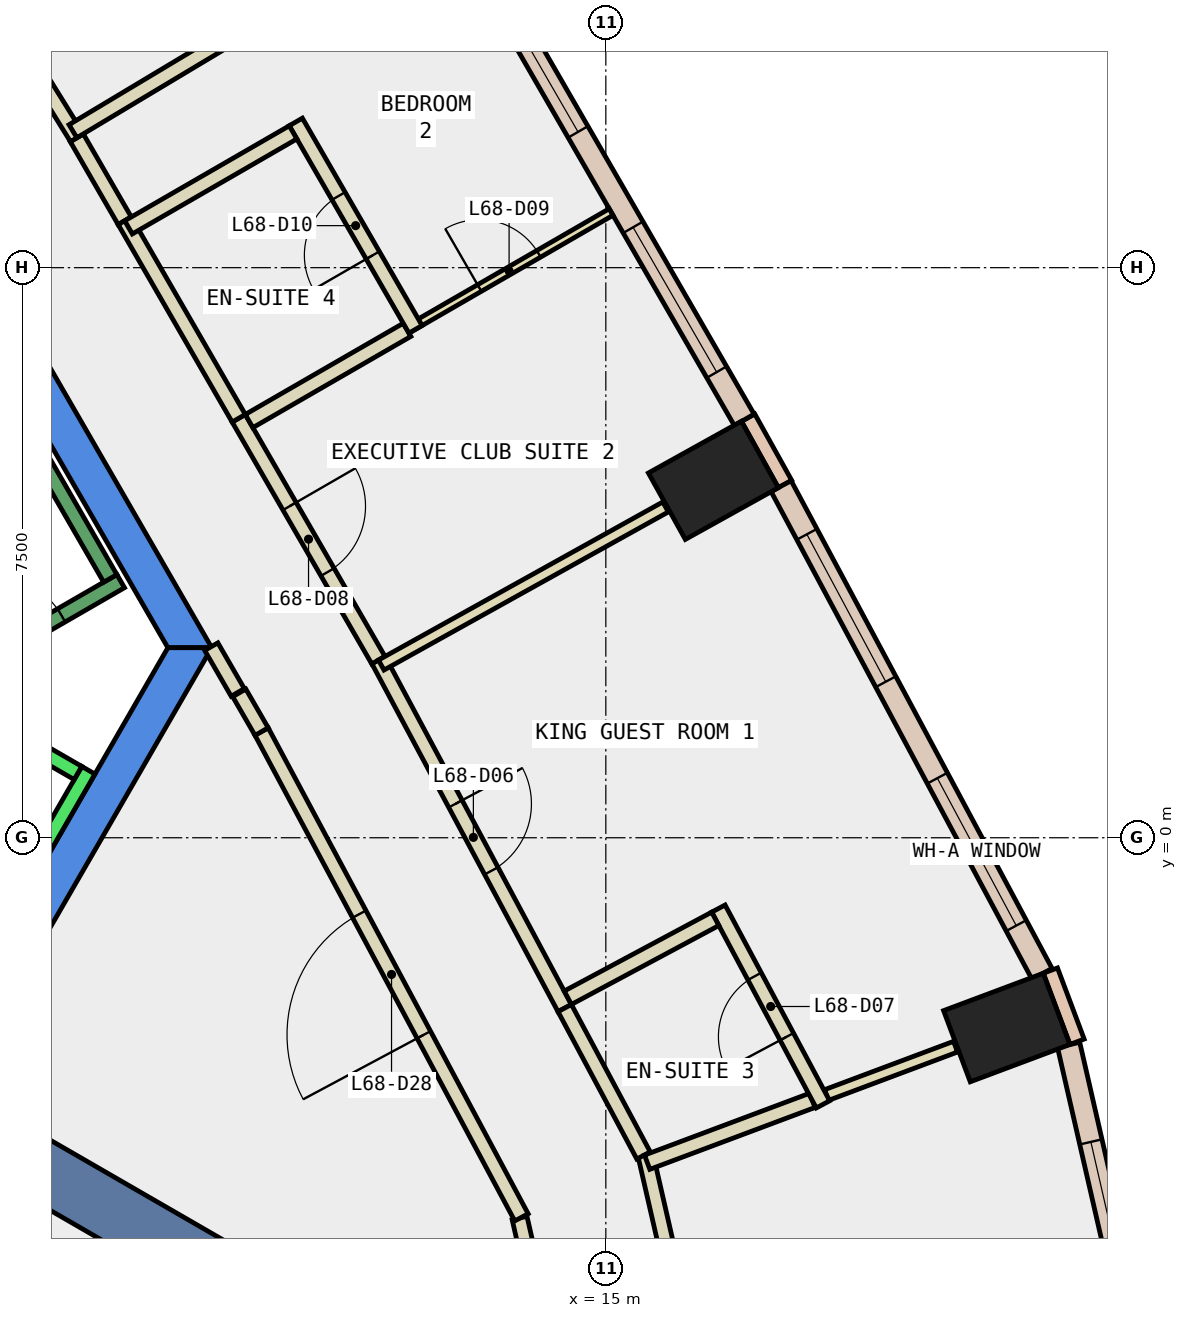
"""IFC4 building model, lengths in metres.
Left out: names, types, materials, properties, quantities, classifications, styles, units other than length and angle.
Written with IfcOpenShell. Run it as: python <this file> out.ifc"""

import sys

from ifc_helpers import new_model, si_unit, direction, frame, frame_2d, origin, origin_2d, place, context, subcontext, project, spatial, polyline, rectangle, outline, extrude, element, fill, save


model = new_model("IFC4")
c1 = context("Model", 3, precision=1e-05, world=origin(), true_north=direction((0.0, 1.0)))
c2 = subcontext(c1, "Body", "Model", "MODEL_VIEW")
j1 = project(units=[si_unit("LENGTHUNIT", "METRE"), si_unit("PLANEANGLEUNIT", "RADIAN")], contexts=[c1])
p1 = place(None, origin())
s1 = spatial("IfcSite", under=j1, at=p1, CompositionType="ELEMENT")
p2 = place(p1, origin())
s2 = spatial("IfcBuilding", under=s1, at=p2, CompositionType="ELEMENT")
p3 = place(p2, frame((0.0, 0.0, 293.6)))
s3 = spatial("IfcBuildingStorey", under=s2, at=p3, CompositionType="ELEMENT", Elevation=293.6)
for number, where, z_axis, x_axis in (
    (1, (20.275, -2.497, -0.34), (0.0, 0.0, 1.0), (-0.351, 0.936, 0.0)),
    (2, (16.415, 4.702, -0.34), (0.0, 0.0, 1.0), (-0.486, 0.874, 0.0)),
):
    element("IfcColumn", number, at=place(p3, frame(where, z_axis=z_axis, x_axis=x_axis)), inside=s3, PredefinedType="COLUMN", context=c2, shape_type="SweptSolid", body=[
        extrude(rectangle(XDim=1.0, YDim=1.4, at=origin_2d()), origin(), (0.0, 0.0, 1.0), 3.6),
    ])
p4 = place(p3, frame((0.0, 0.0, -0.34)))
e3 = element("IfcWall", 3, at=p4, inside=s3, PredefinedType="SHEAR", context=c2, shape_type="SweptSolid", body=[
    extrude(outline(polyline([(5.486, 9.998), (5.053, 9.748), (9.238, 2.5), (9.815, 2.5), (5.486, 9.998)])), origin(), (0.0, 0.0, 1.0), 3.6),
])
p5 = place(p3, frame((0.0, 0.0, -0.34)))
e4 = element("IfcWall", 4, at=p5, inside=s3, PredefinedType="SHEAR", context=c2, shape_type="SweptSolid", body=[
    extrude(outline(polyline([(4.907, -6.0), (9.815, 2.5), (9.238, 2.5), (4.619, -5.5), (4.907, -6.0)])), origin(), (0.0, 0.0, 1.0), 3.6),
])
p6 = place(p3, frame((6.279, -3.625, -0.34), z_axis=(0.0, 0.0, 1.0), x_axis=(0.866017533419, -0.500013631625, 0.0)))
e5 = element("IfcWall", 5, at=p6, inside=s3, PredefinedType="SHEAR", context=c2, shape_type="SweptSolid", body=[
    extrude(rectangle(XDim=9.0, YDim=0.8, at=frame_2d((4.5, 0.0))), origin(), (0.0, 0.0, 1.0), 3.6),
])
p7 = place(p3, frame((21.2, -2.684, 0.0), z_axis=(0.0, 0.0, 1.0), x_axis=(-0.350962844851, 0.936389385637, 0.0)))
e6 = element("IfcWall", 6, at=p7, inside=s3, PredefinedType="STANDARD", context=c2, shape_type="SweptSolid", body=[
    extrude(rectangle(XDim=1.0, YDim=0.2, at=frame_2d((0.5, 0.0))), origin(), (0.0, 0.0, 1.0), 3.26),
])
p8 = place(p3, frame((17.358, 4.653, 0.0), z_axis=(0.0, 0.0, 1.0), x_axis=(-0.485850211157, 0.874042088414, 0.0)))
e7 = element("IfcWall", 7, at=p8, inside=s3, PredefinedType="STANDARD", context=c2, shape_type="SweptSolid", body=[
    extrude(rectangle(XDim=1.0, YDim=0.2, at=frame_2d((0.5, 0.0))), origin(), (0.0, 0.0, 1.0), 3.26),
])
p9 = place(p3, frame((21.987, -6.642, 0.0), z_axis=(0.0, 0.0, 1.0), x_axis=(-0.223448307338, 0.974715781112, 0.0)))
e8 = element("IfcWall", 8, at=p9, inside=s3, PredefinedType="STANDARD", context=c2, shape_type="SweptSolid", body=[
    extrude(rectangle(XDim=4.019, YDim=0.3, at=frame_2d((2.009, 0.0))), origin(), (0.0, 0.0, 1.0), 3.26),
])
p10 = place(p9, frame((1.309, 0.0, 0.9)))
e9 = element("IfcOpeningElement", 9, at=p10, cuts=e8, PredefinedType="OPENING", context=c2, shape_type="SweptSolid", body=[
    extrude(rectangle(XDim=1.4, YDim=2.0, at=frame_2d((0.7, 1.0))), frame((0.0, 0.16, 0.0), z_axis=(0.0, -1.0, 0.0), x_axis=(1.0, 0.0, 0.0)), (0.0, 0.0, 1.0), 0.32),
])
p11 = place(p3, frame((20.739, -1.79, 0.0), z_axis=(0.0, 0.0, 1.0), x_axis=(-0.471789353675, 0.881711293882, 0.0)))
e10 = element("IfcWall", 10, at=p11, inside=s3, PredefinedType="STANDARD", context=c2, shape_type="SweptSolid", body=[
    extrude(rectangle(XDim=7.277, YDim=0.3, at=frame_2d((3.638, 0.0))), origin(), (0.0, 0.0, 1.0), 3.26),
])
p12 = place(p11, frame((0.719, 0.0, 0.9)))
e11 = element("IfcOpeningElement", 11, at=p12, cuts=e10, PredefinedType="OPENING", context=c2, shape_type="SweptSolid", body=[
    extrude(rectangle(XDim=2.2, YDim=2.0, at=frame_2d((1.1, 1.0))), frame((0.0, 0.16, 0.0), z_axis=(0.0, -1.0, 0.0), x_axis=(1.0, 0.0, 0.0)), (0.0, 0.0, 1.0), 0.32),
])
p13 = place(p11, frame((4.358, 0.0, 0.9)))
e12 = element("IfcOpeningElement", 12, at=p13, cuts=e10, PredefinedType="OPENING", context=c2, shape_type="SweptSolid", body=[
    extrude(rectangle(XDim=2.2, YDim=2.0, at=frame_2d((1.1, 1.0))), frame((0.0, 0.16, 0.0), z_axis=(0.0, -1.0, 0.0), x_axis=(1.0, 0.0, 0.0)), (0.0, 0.0, 1.0), 0.32),
])
p14 = place(p3, frame((16.821, 5.498, 0.0), z_axis=(0.0, 0.0, 1.0), x_axis=(-0.499945412946, 0.866056917341, 0.0)))
e13 = element("IfcWall", 13, at=p14, inside=s3, PredefinedType="STANDARD", context=c2, shape_type="SweptSolid", body=[
    extrude(rectangle(XDim=7.299, YDim=0.3, at=frame_2d((3.649, 0.0))), origin(), (0.0, 0.0, 1.0), 3.26),
])
p15 = place(p14, frame((0.725, 0.0, 0.9)))
e14 = element("IfcOpeningElement", 14, at=p15, cuts=e13, PredefinedType="OPENING", context=c2, shape_type="SweptSolid", body=[
    extrude(rectangle(XDim=2.2, YDim=2.0, at=frame_2d((1.1, 1.0))), frame((0.0, 0.16, 0.0), z_axis=(0.0, -1.0, 0.0), x_axis=(1.0, 0.0, 0.0)), (0.0, 0.0, 1.0), 0.32),
])
p16 = place(p14, frame((4.374, 0.0, 0.9)))
e15 = element("IfcOpeningElement", 15, at=p16, cuts=e13, PredefinedType="OPENING", context=c2, shape_type="SweptSolid", body=[
    extrude(rectangle(XDim=2.2, YDim=2.0, at=frame_2d((1.1, 1.0))), frame((0.0, 0.16, 0.0), z_axis=(0.0, -1.0, 0.0), x_axis=(1.0, 0.0, 0.0)), (0.0, 0.0, 1.0), 0.32),
])
p17 = place(p3, frame((14.335, -7.052, 0.0), z_axis=(0.0, 0.0, 1.0), x_axis=(-0.22355315143, 0.974691740237, 0.0)))
e16 = element("IfcWall", 16, at=p17, inside=s3, PredefinedType="PARTITIONING", context=c2, shape_type="SweptSolid", body=[
    extrude(rectangle(XDim=2.102, YDim=0.2, at=frame_2d((1.051, 0.0))), origin(), (0.0, 0.0, 1.0), 3.26),
])
p18 = place(p3, frame((13.89, -4.994, 0.0), z_axis=(0.0, 0.0, 1.0), x_axis=(-0.471713767504, 0.881751734644, 0.0)))
e17 = element("IfcWall", 17, at=p18, inside=s3, PredefinedType="PARTITIONING", context=c2, shape_type="SweptSolid", body=[
    extrude(rectangle(XDim=7.248, YDim=0.2, at=frame_2d((3.624, 0.0))), origin(), (0.0, 0.0, 1.0), 3.26),
])
p19 = place(p18, frame((2.724, 0.0, 0.0)))
e18 = element("IfcOpeningElement", 18, at=p19, cuts=e17, PredefinedType="OPENING", context=c2, shape_type="SweptSolid", body=[
    extrude(rectangle(XDim=1.8, YDim=2.1, at=frame_2d((0.9, 1.05))), frame((0.0, 0.11, 0.0), z_axis=(0.0, -1.0, 0.0), x_axis=(1.0, 0.0, 0.0)), (0.0, 0.0, 1.0), 0.22),
])
p20 = place(p3, frame((10.471, 1.397, 0.0), z_axis=(0.0, 0.0, 1.0), x_axis=(-0.500069990121, 0.865984991198, 0.0)))
e19 = element("IfcWall", 19, at=p20, inside=s3, PredefinedType="PARTITIONING", context=c2, shape_type="SweptSolid", body=[
    extrude(rectangle(XDim=0.588, YDim=0.2, at=frame_2d((0.294, 0.0))), origin(), (0.0, 0.0, 1.0), 3.26),
])
p21 = place(p3, frame((10.157, 1.912, 0.0), z_axis=(0.0, 0.0, 1.0), x_axis=(-0.500482383858, 0.865746720148, 0.0)))
e20 = element("IfcWall", 20, at=p21, inside=s3, PredefinedType="PARTITIONING", context=c2, shape_type="SweptSolid", body=[
    extrude(rectangle(XDim=0.695, YDim=0.2, at=frame_2d((0.348, 0.0))), origin(), (0.0, 0.0, 1.0), 3.26),
])
p22 = place(p3, frame((15.521, -4.171, 0.0), z_axis=(0.0, 0.0, 1.0), x_axis=(0.223416387785, -0.974723097946, 0.0)))
e21 = element("IfcWall", 21, at=p22, inside=s3, PredefinedType="PARTITIONING", context=c2, shape_type="SweptSolid", body=[
    extrude(rectangle(XDim=3.003, YDim=0.2, at=frame_2d((1.501, 0.0))), origin(), (0.0, 0.0, 1.0), 3.26),
])
p23 = place(p3, frame((12.009, 2.338, 0.0), z_axis=(0.0, 0.0, 1.0), x_axis=(0.471771260231, -0.88172097515, 0.0)))
e22 = element("IfcWall", 22, at=p23, inside=s3, PredefinedType="PARTITIONING", context=c2, shape_type="SweptSolid", body=[
    extrude(rectangle(XDim=5.193, YDim=0.2, at=frame_2d((2.597, 0.0))), origin(), (0.0, 0.0, 1.0), 3.26),
])
p24 = place(p23, frame((2.146, 0.0, 0.0)))
e23 = element("IfcOpeningElement", 23, at=p24, cuts=e22, PredefinedType="OPENING", context=c2, shape_type="SweptSolid", body=[
    extrude(rectangle(XDim=1.0, YDim=2.1, at=frame_2d((0.5, 1.05))), frame((0.0, 0.11, 0.0), z_axis=(0.0, -1.0, 0.0), x_axis=(1.0, 0.0, 0.0)), (0.0, 0.0, 1.0), 0.22),
])
p25 = place(p3, frame((14.459, -2.241, 0.0), z_axis=(0.0, 0.0, 1.0), x_axis=(0.471648235011, -0.881786789656, 0.0)))
e24 = element("IfcWall", 24, at=p25, inside=s3, PredefinedType="PARTITIONING", context=c2, shape_type="SweptSolid", body=[
    extrude(rectangle(XDim=2.199, YDim=0.2, at=frame_2d((1.1, 0.0))), origin(), (0.0, 0.0, 1.0), 3.26),
])
p26 = place(p3, frame((10.17, 5.519, 0.0), z_axis=(0.0, 0.0, 1.0), x_axis=(0.499990860175, -0.866030680601, 0.0)))
e25 = element("IfcWall", 25, at=p26, inside=s3, PredefinedType="PARTITIONING", context=c2, shape_type="SweptSolid", body=[
    extrude(rectangle(XDim=3.674, YDim=0.2, at=frame_2d((1.837, 0.0))), origin(), (0.0, 0.0, 1.0), 3.26),
])
p27 = place(p26, frame((1.337, 0.0, 0.0)))
e26 = element("IfcOpeningElement", 26, at=p27, cuts=e25, PredefinedType="OPENING", context=c2, shape_type="SweptSolid", body=[
    extrude(rectangle(XDim=1.0, YDim=2.1, at=frame_2d((0.5, 1.05))), frame((0.0, 0.11, 0.0), z_axis=(0.0, -1.0, 0.0), x_axis=(1.0, 0.0, 0.0)), (0.0, 0.0, 1.0), 0.22),
])
p28 = place(p3, frame((8.039, 9.209, 0.0), z_axis=(0.0, 0.0, 1.0), x_axis=(0.500219543227, -0.865898613334, 0.0)))
e27 = element("IfcWall", 27, at=p28, inside=s3, PredefinedType="PARTITIONING", context=c2, shape_type="SweptSolid", body=[
    extrude(rectangle(XDim=1.261, YDim=0.2, at=frame_2d((0.631, 0.0))), origin(), (0.0, 0.0, 1.0), 3.26),
])
p29 = place(p3, frame((8.67, 8.117, 0.0), z_axis=(0.0, 0.0, 1.0), x_axis=(0.50002537861, -0.866010750942, 0.0)))
e28 = element("IfcWall", 28, at=p29, inside=s3, PredefinedType="PARTITIONING", context=c2, shape_type="SweptSolid", body=[
    extrude(rectangle(XDim=3.0, YDim=0.2, at=frame_2d((1.5, 0.0))), origin(), (0.0, 0.0, 1.0), 3.26),
])
p30 = place(p3, frame((6.775, 11.249, 0.0), z_axis=(0.0, 0.0, 1.0), x_axis=(0.527803270752, -0.849366650736, 0.0)))
e29 = element("IfcWall", 29, at=p30, inside=s3, PredefinedType="PARTITIONING", context=c2, shape_type="SweptSolid", body=[
    extrude(rectangle(XDim=2.401, YDim=0.2, at=frame_2d((1.2, 0.0))), origin(), (0.0, 0.0, 1.0), 3.26),
])
p31 = place(p3, frame((17.904, -3.385, 0.0), z_axis=(0.0, 0.0, 1.0), x_axis=(0.936401128709, 0.350931512054, 0.0)))
e30 = element("IfcWall", 30, at=p31, inside=s3, PredefinedType="PARTITIONING", context=c2, shape_type="SweptSolid", body=[
    extrude(rectangle(XDim=1.812, YDim=0.15, at=frame_2d((0.906, 0.0))), origin(), (0.0, 0.0, 1.0), 3.26),
])
p32 = place(p3, frame((15.544, -4.269, 0.0), z_axis=(0.0, 0.0, 1.0), x_axis=(0.936463142424, 0.350765994477, 0.0)))
e31 = element("IfcWall", 31, at=p32, inside=s3, PredefinedType="PARTITIONING", context=c2, shape_type="SweptSolid", body=[
    extrude(rectangle(XDim=2.321, YDim=0.2, at=frame_2d((1.16, 0.0))), origin(), (0.0, 0.0, 1.0), 3.26),
])
p33 = place(p3, frame((17.857, -3.508, 0.0), z_axis=(0.0, 0.0, 1.0), x_axis=(-0.47112614664, 0.882065844454, 0.0)))
e32 = element("IfcWall", 32, at=p33, inside=s3, PredefinedType="PARTITIONING", context=c2, shape_type="SweptSolid", body=[
    extrude(rectangle(XDim=2.921, YDim=0.2, at=frame_2d((1.46, 0.0))), origin(), (0.0, 0.0, 1.0), 3.26),
])
p34 = place(p33, frame((1.01, 0.0, 0.0)))
e33 = element("IfcOpeningElement", 33, at=p34, cuts=e32, PredefinedType="OPENING", context=c2, shape_type="SweptSolid", body=[
    extrude(rectangle(XDim=0.9, YDim=2.1, at=frame_2d((0.45, 1.05))), frame((0.0, 0.11, 0.0), z_axis=(0.0, -1.0, 0.0), x_axis=(1.0, 0.0, 0.0)), (0.0, 0.0, 1.0), 0.22),
])
p35 = place(p3, frame((16.44, -1.067, 0.0), z_axis=(0.0, 0.0, 1.0), x_axis=(-0.881700916894, -0.471808746367, 0.0)))
e34 = element("IfcWall", 34, at=p35, inside=s3, PredefinedType="PARTITIONING", context=c2, shape_type="SweptSolid", body=[
    extrude(rectangle(XDim=2.2, YDim=0.2, at=frame_2d((1.1, 0.0))), origin(), (0.0, 0.0, 1.0), 3.26),
])
p36 = place(p3, frame((12.045, 2.272, 0.0), z_axis=(0.0, 0.0, 1.0), x_axis=(0.873982340973, 0.485957680943, 0.0)))
e35 = element("IfcWall", 35, at=p36, inside=s3, PredefinedType="PARTITIONING", context=c2, shape_type="SweptSolid", body=[
    extrude(rectangle(XDim=4.28, YDim=0.15, at=frame_2d((2.14, 0.0))), origin(), (0.0, 0.0, 1.0), 3.26),
])
p37 = place(p3, frame((12.385, 6.682, 0.0), z_axis=(0.0, 0.0, 1.0), x_axis=(0.865970446821, 0.500095176175, 0.0)))
e36 = element("IfcWall", 36, at=p37, inside=s3, PredefinedType="PARTITIONING", context=c2, shape_type="SweptSolid", body=[
    extrude(rectangle(XDim=3.1, YDim=0.1, at=frame_2d((1.55, 0.0))), origin(), (0.0, 0.0, 1.0), 3.26),
])
p38 = place(p37, frame((1.1, 0.0, 0.0)))
e37 = element("IfcOpeningElement", 37, at=p38, cuts=e36, PredefinedType="OPENING", context=c2, shape_type="SweptSolid", body=[
    extrude(rectangle(XDim=0.9, YDim=2.1, at=frame_2d((0.45, 1.05))), frame((0.0, 0.06, 0.0), z_axis=(0.0, -1.0, 0.0), x_axis=(1.0, 0.0, 0.0)), (0.0, 0.0, 1.0), 0.12),
])
p39 = place(p3, frame((10.306, 5.482, 0.0), z_axis=(0.0, 0.0, 1.0), x_axis=(0.866100915363, 0.499869187296, 0.0)))
e38 = element("IfcWall", 38, at=p39, inside=s3, PredefinedType="PARTITIONING", context=c2, shape_type="SweptSolid", body=[
    extrude(rectangle(XDim=2.401, YDim=0.2, at=frame_2d((1.2, 0.0))), origin(), (0.0, 0.0, 1.0), 3.26),
])
p40 = place(p3, frame((12.496, 6.689, 0.0), z_axis=(0.0, 0.0, 1.0), x_axis=(-0.500039995618, 0.866002311072, 0.0)))
e39 = element("IfcWall", 39, at=p40, inside=s3, PredefinedType="PARTITIONING", context=c2, shape_type="SweptSolid", body=[
    extrude(rectangle(XDim=3.15, YDim=0.2, at=frame_2d((1.575, 0.0))), origin(), (0.0, 0.0, 1.0), 3.26),
])
p41 = place(p40, frame((1.125, 0.0, 0.0)))
e40 = element("IfcOpeningElement", 40, at=p41, cuts=e39, PredefinedType="OPENING", context=c2, shape_type="SweptSolid", body=[
    extrude(rectangle(XDim=0.9, YDim=2.1, at=frame_2d((0.45, 1.05))), frame((0.0, 0.11, 0.0), z_axis=(0.0, -1.0, 0.0), x_axis=(1.0, 0.0, 0.0)), (0.0, 0.0, 1.0), 0.22),
])
p42 = place(p3, frame((10.885, 9.28, 0.0), z_axis=(0.0, 0.0, 1.0), x_axis=(-0.866022959057, -0.500004234368, 0.0)))
e41 = element("IfcWall", 41, at=p42, inside=s3, PredefinedType="PARTITIONING", context=c2, shape_type="SweptSolid", body=[
    extrude(rectangle(XDim=2.5, YDim=0.2, at=frame_2d((1.25, 0.0))), origin(), (0.0, 0.0, 1.0), 3.26),
])
p43 = place(p3, frame((7.989, 9.295, 0.0), z_axis=(0.0, 0.0, 1.0), x_axis=(0.857801856135, 0.513980520654, 0.0)))
e42 = element("IfcWall", 42, at=p43, inside=s3, PredefinedType="PARTITIONING", context=c2, shape_type="SweptSolid", body=[
    extrude(rectangle(XDim=2.3, YDim=0.2, at=frame_2d((1.15, 0.0))), origin(), (0.0, 0.0, 1.0), 3.26),
])
p44 = place(p3, frame((5.492, -3.788, 0.0), z_axis=(0.0, 0.0, 1.0), x_axis=(0.500034260056, 0.866005622828, 0.0)))
e43 = element("IfcWall", 43, at=p44, inside=s3, PredefinedType="STANDARD", context=c2, shape_type="SweptSolid", body=[
    extrude(rectangle(XDim=5.399, YDim=0.2, at=frame_2d((2.7, 0.0))), origin(), (0.0, 0.0, 1.0), 3.26),
])
p45 = place(p3, frame((5.977, 2.052, 0.0), z_axis=(0.0, 0.0, 1.0), x_axis=(0.865973769406, -0.500089422704, 0.0)))
e44 = element("IfcWall", 44, at=p45, inside=s3, PredefinedType="STANDARD", context=c2, shape_type="SweptSolid", body=[
    extrude(rectangle(XDim=2.399, YDim=0.2, at=frame_2d((1.2, 0.0))), origin(), (0.0, 0.0, 1.0), 3.26),
])
p46 = place(p3, frame((4.806, 1.176, 0.0), z_axis=(0.0, 0.0, 1.0), x_axis=(0.866059941101, 0.499940174841, 0.0)))
e45 = element("IfcWall", 45, at=p46, inside=s3, PredefinedType="STANDARD", context=c2, shape_type="SweptSolid", body=[
    extrude(rectangle(XDim=4.4, YDim=0.2, at=frame_2d((2.2, 0.0))), origin(), (0.0, 0.0, 1.0), 3.26),
])
p47 = place(p46, frame((2.4, 0.0, 0.0)))
e46 = element("IfcOpeningElement", 46, at=p47, cuts=e45, PredefinedType="OPENING", context=c2, shape_type="SweptSolid", body=[
    extrude(rectangle(XDim=1.1, YDim=2.2, at=frame_2d((0.55, 1.1))), frame((0.0, 0.11, 0.0), z_axis=(0.0, -1.0, 0.0), x_axis=(1.0, 0.0, 0.0)), (0.0, 0.0, 1.0), 0.22),
])
p48 = place(p3, frame((8.48, 3.412, 0.0), z_axis=(0.0, 0.0, 1.0), x_axis=(-0.499978703459, 0.866037698999, 0.0)))
e47 = element("IfcWall", 47, at=p48, inside=s3, PredefinedType="STANDARD", context=c2, shape_type="SweptSolid", body=[
    extrude(rectangle(XDim=6.9, YDim=0.2, at=frame_2d((3.45, 0.0))), origin(), (0.0, 0.0, 1.0), 3.26),
])
p49 = place(p10, origin())
e48 = element("IfcWindow", 48, at=p49, inside=s3, PartitioningType="SINGLE_PANEL", PredefinedType="WINDOW", context=c2, shape_type="SweptSolid", body=[
    extrude(rectangle(XDim=1.4, YDim=2.0, at=frame_2d((0.7, 1.0))), frame((0.0, 0.03, 0.0), z_axis=(0.0, -1.0, 0.0), x_axis=(1.0, 0.0, 0.0)), (0.0, 0.0, 1.0), 0.06),
])
fill(e9, e48)
p50 = place(p12, origin())
e49 = element("IfcWindow", 49, at=p50, inside=s3, PartitioningType="SINGLE_PANEL", PredefinedType="WINDOW", context=c2, shape_type="SweptSolid", body=[
    extrude(rectangle(XDim=2.2, YDim=2.0, at=frame_2d((1.1, 1.0))), frame((0.0, 0.03, 0.0), z_axis=(0.0, -1.0, 0.0), x_axis=(1.0, 0.0, 0.0)), (0.0, 0.0, 1.0), 0.06),
])
fill(e11, e49)
p51 = place(p13, origin())
e50 = element("IfcWindow", 50, at=p51, inside=s3, PartitioningType="SINGLE_PANEL", PredefinedType="WINDOW", context=c2, shape_type="SweptSolid", body=[
    extrude(rectangle(XDim=2.2, YDim=2.0, at=frame_2d((1.1, 1.0))), frame((0.0, 0.03, 0.0), z_axis=(0.0, -1.0, 0.0), x_axis=(1.0, 0.0, 0.0)), (0.0, 0.0, 1.0), 0.06),
])
fill(e12, e50)
p52 = place(p15, origin())
e51 = element("IfcWindow", 51, at=p52, inside=s3, PartitioningType="SINGLE_PANEL", PredefinedType="WINDOW", context=c2, shape_type="SweptSolid", body=[
    extrude(rectangle(XDim=2.2, YDim=2.0, at=frame_2d((1.1, 1.0))), frame((0.0, 0.03, 0.0), z_axis=(0.0, -1.0, 0.0), x_axis=(1.0, 0.0, 0.0)), (0.0, 0.0, 1.0), 0.06),
])
fill(e14, e51)
p53 = place(p16, origin())
e52 = element("IfcWindow", 52, at=p53, inside=s3, PartitioningType="SINGLE_PANEL", PredefinedType="WINDOW", context=c2, shape_type="SweptSolid", body=[
    extrude(rectangle(XDim=2.2, YDim=2.0, at=frame_2d((1.1, 1.0))), frame((0.0, 0.03, 0.0), z_axis=(0.0, -1.0, 0.0), x_axis=(1.0, 0.0, 0.0)), (0.0, 0.0, 1.0), 0.06),
])
fill(e15, e52)
p54 = place(p24, origin())
e53 = element("IfcDoor", 53, at=p54, inside=s3, OperationType="SINGLE_SWING_LEFT", PredefinedType="DOOR", context=c2, shape_type="SweptSolid", body=[
    extrude(rectangle(XDim=1.0, YDim=2.1, at=frame_2d((0.5, 1.05))), frame((0.0, 0.025, 0.0), z_axis=(0.0, -1.0, 0.0), x_axis=(1.0, 0.0, 0.0)), (0.0, 0.0, 1.0), 0.05),
])
fill(e23, e53)
p55 = place(p34, origin())
e54 = element("IfcDoor", 54, at=p55, inside=s3, OperationType="SINGLE_SWING_RIGHT", PredefinedType="DOOR", context=c2, shape_type="SweptSolid", body=[
    extrude(rectangle(XDim=0.9, YDim=2.1, at=frame_2d((0.45, 1.05))), frame((0.0, 0.025, 0.0), z_axis=(0.0, -1.0, 0.0), x_axis=(1.0, 0.0, 0.0)), (0.0, 0.0, 1.0), 0.05),
])
fill(e33, e54)
p56 = place(p27, origin())
e55 = element("IfcDoor", 55, at=p56, inside=s3, OperationType="SINGLE_SWING_LEFT", PredefinedType="DOOR", context=c2, shape_type="SweptSolid", body=[
    extrude(rectangle(XDim=1.0, YDim=2.1, at=frame_2d((0.5, 1.05))), frame((0.0, 0.025, 0.0), z_axis=(0.0, -1.0, 0.0), x_axis=(1.0, 0.0, 0.0)), (0.0, 0.0, 1.0), 0.05),
])
fill(e26, e55)
p57 = place(p38, origin())
e56 = element("IfcDoor", 56, at=p57, inside=s3, OperationType="SINGLE_SWING_RIGHT", PredefinedType="DOOR", context=c2, shape_type="SweptSolid", body=[
    extrude(rectangle(XDim=0.9, YDim=2.1, at=frame_2d((0.45, 1.05))), frame((0.0, 0.025, 0.0), z_axis=(0.0, -1.0, 0.0), x_axis=(1.0, 0.0, 0.0)), (0.0, 0.0, 1.0), 0.05),
])
fill(e37, e56)
p58 = place(p41, origin())
e57 = element("IfcDoor", 57, at=p58, inside=s3, OperationType="SINGLE_SWING_RIGHT", PredefinedType="DOOR", context=c2, shape_type="SweptSolid", body=[
    extrude(rectangle(XDim=0.9, YDim=2.1, at=frame_2d((0.45, 1.05))), frame((0.0, 0.025, 0.0), z_axis=(0.0, -1.0, 0.0), x_axis=(1.0, 0.0, 0.0)), (0.0, 0.0, 1.0), 0.05),
])
fill(e40, e57)
p59 = place(p19, origin())
e58 = element("IfcDoor", 58, at=p59, inside=s3, OperationType="DOUBLE_DOOR_SINGLE_SWING", PredefinedType="DOOR", context=c2, shape_type="SweptSolid", body=[
    extrude(rectangle(XDim=1.8, YDim=2.1, at=frame_2d((0.9, 1.05))), frame((0.0, 0.025, 0.0), z_axis=(0.0, -1.0, 0.0), x_axis=(1.0, 0.0, 0.0)), (0.0, 0.0, 1.0), 0.05),
])
fill(e18, e58)
p60 = place(p47, origin())
e59 = element("IfcDoor", 59, at=p60, inside=s3, OperationType="SINGLE_SWING_LEFT", PredefinedType="DOOR", context=c2, shape_type="SweptSolid", body=[
    extrude(rectangle(XDim=1.1, YDim=2.2, at=frame_2d((0.55, 1.1))), frame((0.0, 0.025, 0.0), z_axis=(0.0, -1.0, 0.0), x_axis=(1.0, 0.0, 0.0)), (0.0, 0.0, 1.0), 0.05),
])
fill(e46, e59)
save(model, sys.argv[1])
